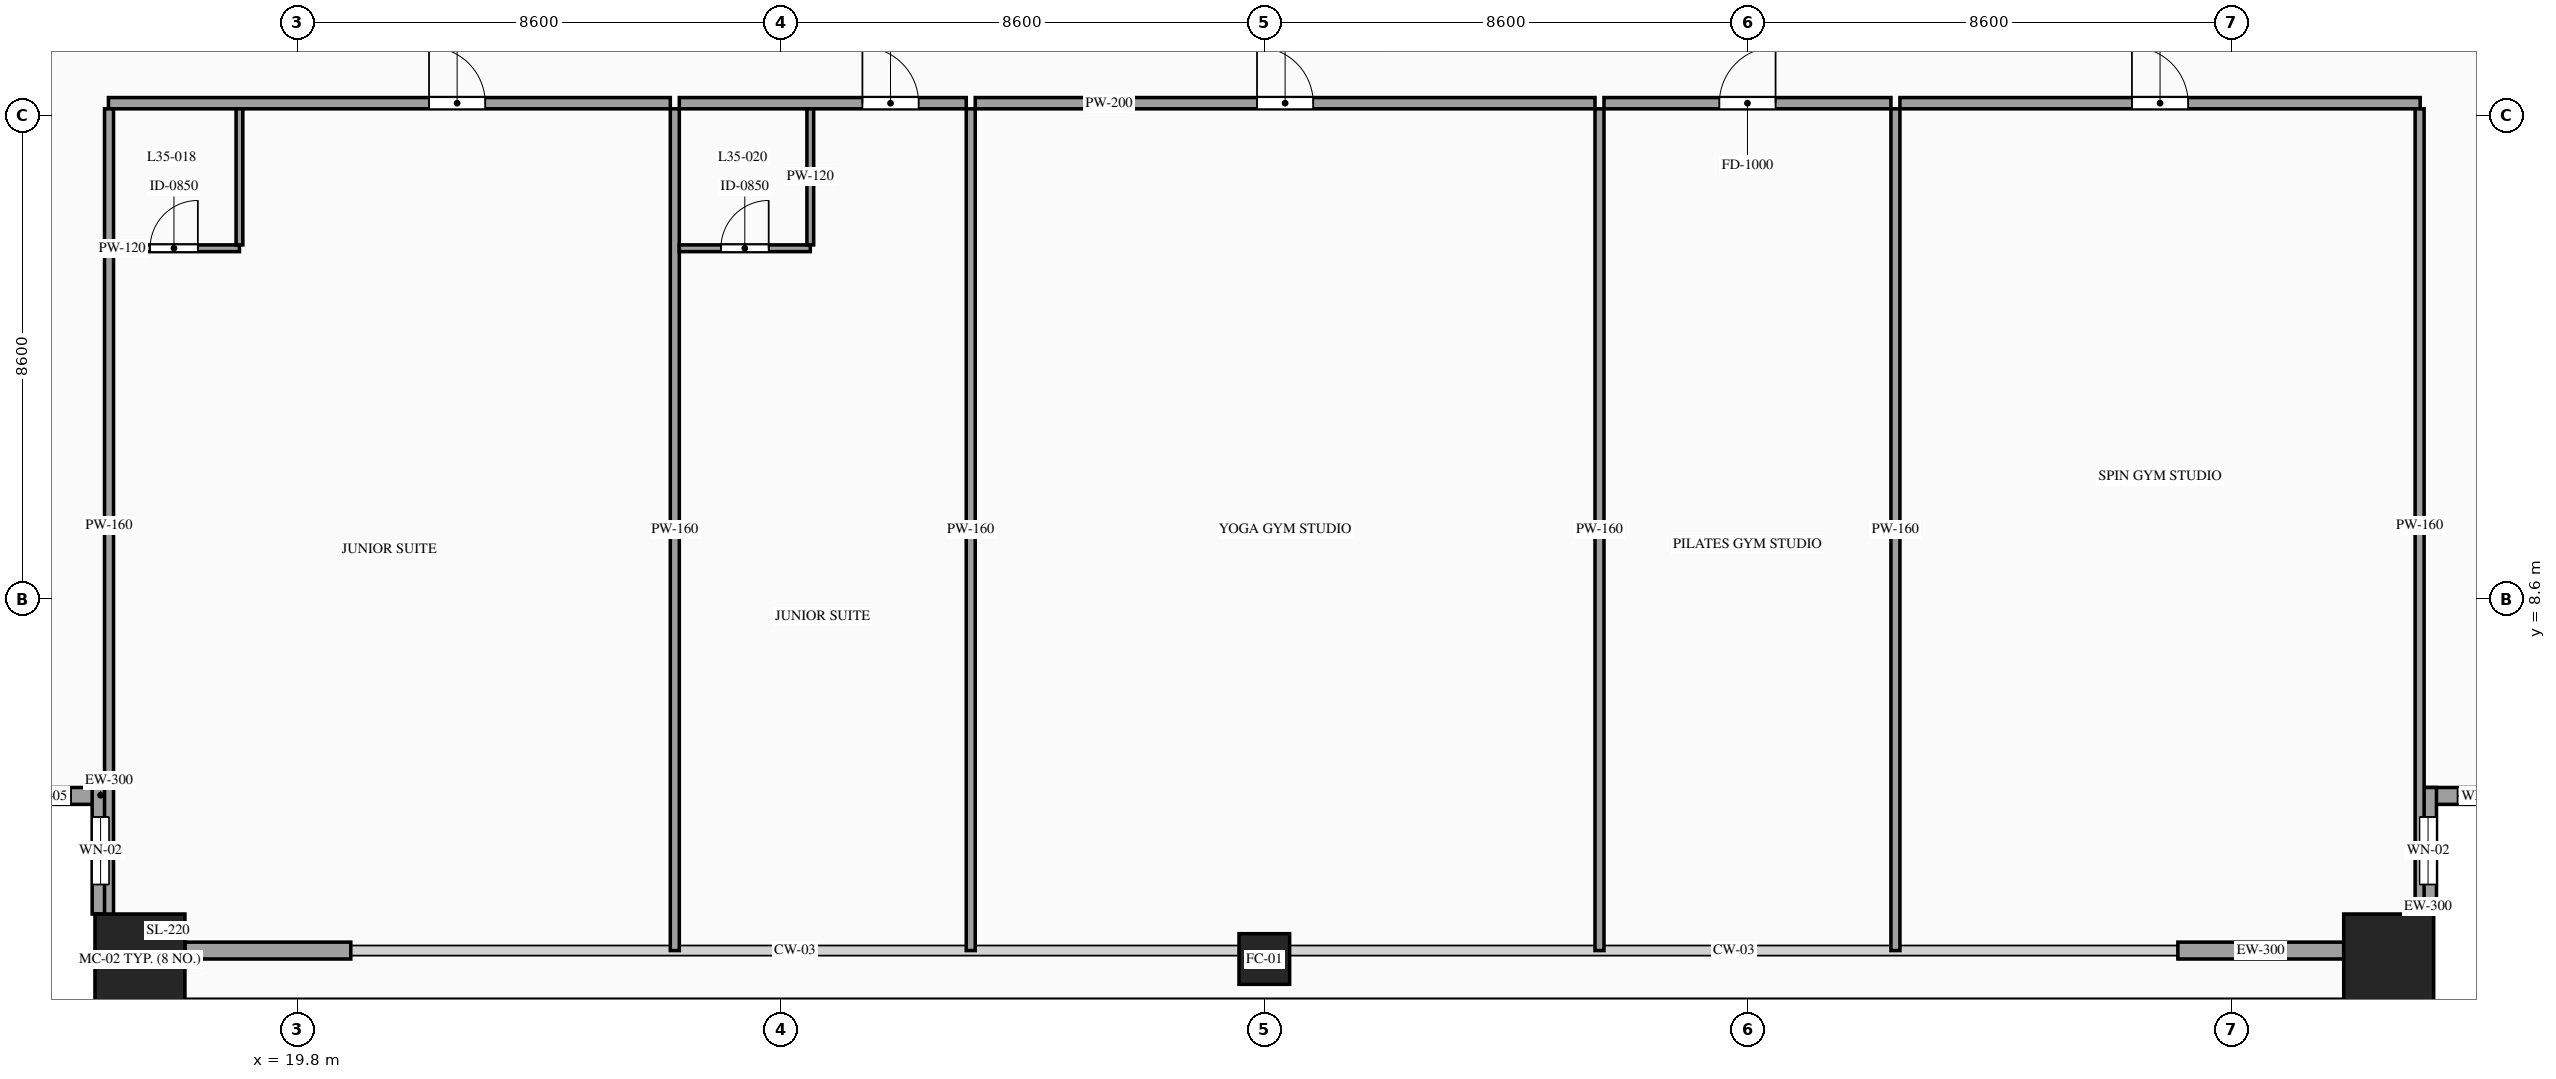
"""IFC4 building model, lengths in metres.
Left out: names, types, materials, properties, quantities, classifications, styles, units other than length and angle.
Written with IfcOpenShell. Run it as: python <this file> out.ifc"""

import sys

from ifc_helpers import new_model, si_unit, direction, frame, frame_2d, origin, origin_2d, place, context, subcontext, project, spatial, rectangle, hollow_rectangle, extrude, source, transform, mapped, element, fill, save


model = new_model("IFC4")
c1 = context("Model", 3, precision=1e-05, world=origin(), true_north=direction((0.0, 1.0)))
c2 = subcontext(c1, "Body", "Model", "MODEL_VIEW")
j1 = project(units=[si_unit("LENGTHUNIT", "METRE"), si_unit("PLANEANGLEUNIT", "RADIAN")], contexts=[c1])
p1 = place(None, origin())
s1 = spatial("IfcSite", under=j1, at=p1, CompositionType="ELEMENT")
p2 = place(p1, origin())
s2 = spatial("IfcBuilding", under=s1, at=p2, CompositionType="ELEMENT")
p3 = place(p2, frame((0.0, 0.0, 134.4)))
s3 = spatial("IfcBuildingStorey", under=s2, at=p3, CompositionType="ELEMENT", Elevation=134.4)
m1 = source(origin(), c2, "Body", "SweptSolid", [
    extrude(hollow_rectangle(XDim=1.6, YDim=1.6, WallThickness=0.07, at=origin_2d()), origin(), (0.0, 0.0, 1.0), 3.6),
])
p4 = place(p3, frame((17.0, 2.2, 0.0), z_axis=(0.0, 0.0, 1.0), x_axis=(1.0, 0.0, 0.0)))
e1 = element("IfcColumn", 1, at=p4, inside=s3, PredefinedType="COLUMN", context=c2, shape_type="MappedRepresentation", body=[
    mapped(m1, transform((0.0, 0.0, 0.0), scale=1.0)),
])
m2 = source(origin(), c2, "Body", "SweptSolid", [
    extrude(hollow_rectangle(XDim=0.9, YDim=0.9, WallThickness=0.042, at=origin_2d()), origin(), (0.0, 0.0, 1.0), 3.6),
])
p5 = place(p3, frame((37.0, 2.2, 0.0), z_axis=(0.0, 0.0, 1.0), x_axis=(1.0, 0.0, 0.0)))
e2 = element("IfcColumn", 2, at=p5, inside=s3, PredefinedType="COLUMN", context=c2, shape_type="MappedRepresentation", body=[
    mapped(m2, transform((0.0, 0.0, 0.0), scale=1.0)),
])
p6 = place(p3, frame((57.0, 2.2, 0.0), z_axis=(0.0, 0.0, 1.0), x_axis=(1.0, 0.0, 0.0)))
e3 = element("IfcColumn", 3, at=p6, inside=s3, PredefinedType="COLUMN", context=c2, shape_type="MappedRepresentation", body=[
    mapped(m1, transform((0.0, 0.0, 0.0), scale=1.0)),
])
p7 = place(p3, frame((14.2, 5.1, 0.0), z_axis=(0.0, 0.0, 1.0), x_axis=(1.0, 0.0, 0.0)))
e4 = element("IfcWall", 4, at=p7, inside=s3, PredefinedType="SOLIDWALL", context=c2, shape_type="SweptSolid", body=[
    extrude(rectangle(XDim=2.25, YDim=0.3, at=frame_2d((1.125, 0.0))), origin(), (0.0, 0.0, 1.0), 3.38),
])
p8 = place(p7, frame((0.675, 0.0, 0.85)))
e5 = element("IfcOpeningElement", 5, at=p8, cuts=e4, PredefinedType="OPENING", context=c2, shape_type="SweptSolid", body=[
    extrude(rectangle(XDim=0.9, YDim=1.5, at=frame_2d((0.45, 0.75))), frame((0.0, 0.165, 0.0), z_axis=(0.0, -1.0, 0.0), x_axis=(1.0, 0.0, 0.0)), (0.0, 0.0, 1.0), 0.33),
])
p9 = place(p3, frame((16.3, 5.25, 0.0), z_axis=(0.0, 0.0, 1.0), x_axis=(0.0, -1.0, 0.0)))
e6 = element("IfcWall", 6, at=p9, inside=s3, PredefinedType="SOLIDWALL", context=c2, shape_type="SweptSolid", body=[
    extrude(rectangle(XDim=2.25, YDim=0.3, at=frame_2d((1.125, 0.0))), origin(), (0.0, 0.0, 1.0), 3.38),
])
p10 = place(p9, frame((0.525, 0.0, 0.85)))
e7 = element("IfcOpeningElement", 7, at=p10, cuts=e6, PredefinedType="OPENING", context=c2, shape_type="SweptSolid", body=[
    extrude(rectangle(XDim=1.2, YDim=2.1, at=frame_2d((0.6, 1.05))), frame((0.0, 0.165, 0.0), z_axis=(0.0, -1.0, 0.0), x_axis=(1.0, 0.0, 0.0)), (0.0, 0.0, 1.0), 0.33),
])
p11 = place(p3, frame((57.55, 5.1, 0.0), z_axis=(0.0, 0.0, 1.0), x_axis=(1.0, 0.0, 0.0)))
e8 = element("IfcWall", 8, at=p11, inside=s3, PredefinedType="SOLIDWALL", context=c2, shape_type="SweptSolid", body=[
    extrude(rectangle(XDim=2.25, YDim=0.3, at=frame_2d((1.125, 0.0))), origin(), (0.0, 0.0, 1.0), 3.38),
])
p12 = place(p11, frame((0.675, 0.0, 0.85)))
e9 = element("IfcOpeningElement", 9, at=p12, cuts=e8, PredefinedType="OPENING", context=c2, shape_type="SweptSolid", body=[
    extrude(rectangle(XDim=0.9, YDim=1.5, at=frame_2d((0.45, 0.75))), frame((0.0, 0.165, 0.0), z_axis=(0.0, -1.0, 0.0), x_axis=(1.0, 0.0, 0.0)), (0.0, 0.0, 1.0), 0.33),
])
p13 = place(p3, frame((57.7, 3.0, 0.0), z_axis=(0.0, 0.0, 1.0), x_axis=(0.0, 1.0, 0.0)))
e10 = element("IfcWall", 10, at=p13, inside=s3, PredefinedType="SOLIDWALL", context=c2, shape_type="SweptSolid", body=[
    extrude(rectangle(XDim=2.25, YDim=0.3, at=frame_2d((1.125, 0.0))), origin(), (0.0, 0.0, 1.0), 3.38),
])
p14 = place(p13, frame((0.525, 0.0, 0.85)))
e11 = element("IfcOpeningElement", 11, at=p14, cuts=e10, PredefinedType="OPENING", context=c2, shape_type="SweptSolid", body=[
    extrude(rectangle(XDim=1.2, YDim=2.1, at=frame_2d((0.6, 1.05))), frame((0.0, 0.165, 0.0), z_axis=(0.0, -1.0, 0.0), x_axis=(1.0, 0.0, 0.0)), (0.0, 0.0, 1.0), 0.33),
])
m3 = source(origin(), c2, "Body", "SweptSolid", [
    extrude(rectangle(XDim=2.95, YDim=0.3, at=frame_2d((1.475, 0.0))), origin(), (0.0, 0.0, 1.0), 2.775),
])
for number, where, z_axis, x_axis in (
    (12, (17.8, 2.35, 0.0), (0.0, 0.0, 1.0), (1.0, 0.0, 0.0)),
    (13, (53.25, 2.35, 0.0), (0.0, 0.0, 1.0), (1.0, 0.0, 0.0)),
):
    element("IfcWall", number, at=place(p3, frame(where, z_axis=z_axis, x_axis=x_axis)), inside=s3, PredefinedType="SOLIDWALL", context=c2, shape_type="MappedRepresentation", body=[
        mapped(m3, transform((0.0, 0.0, 0.0), scale=1.0)),
    ])
p15 = place(p3, frame((16.44, 17.42, 0.0), z_axis=(0.0, 0.0, 1.0), x_axis=(1.0, 0.0, 0.0)))
e14 = element("IfcWall", 14, at=p15, inside=s3, PredefinedType="PARTITIONING", context=c2, shape_type="SweptSolid", body=[
    extrude(rectangle(XDim=9.994, YDim=0.2, at=frame_2d((4.997, 0.0))), origin(), (0.0, 0.0, 1.0), 3.38),
])
p16 = place(p15, frame((5.702, 0.0, 0.0)))
e15 = element("IfcOpeningElement", 15, at=p16, cuts=e14, PredefinedType="OPENING", context=c2, shape_type="SweptSolid", body=[
    extrude(rectangle(XDim=1.0, YDim=2.2, at=frame_2d((0.5, 1.1))), frame((0.0, 0.115, 0.0), z_axis=(0.0, -1.0, 0.0), x_axis=(1.0, 0.0, 0.0)), (0.0, 0.0, 1.0), 0.23),
])
m4 = source(origin(), c2, "Body", "SweptSolid", [
    extrude(rectangle(XDim=14.97, YDim=0.16, at=frame_2d((7.485, 0.0))), origin(), (0.0, 0.0, 1.0), 3.38),
])
p17 = place(p3, frame((26.514, 2.35, 0.0), z_axis=(0.0, 0.0, 1.0), x_axis=(0.0, 1.0, 0.0)))
e16 = element("IfcWall", 16, at=p17, inside=s3, PredefinedType="PARTITIONING", context=c2, shape_type="MappedRepresentation", body=[
    mapped(m4, transform((0.0, 0.0, 0.0), scale=1.0)),
])
p18 = place(p3, frame((16.44, 14.84, 0.0), z_axis=(0.0, 0.0, 1.0), x_axis=(1.0, 0.0, 0.0)))
e17 = element("IfcWall", 17, at=p18, inside=s3, PredefinedType="PARTITIONING", context=c2, shape_type="SweptSolid", body=[
    extrude(rectangle(XDim=2.33, YDim=0.12, at=frame_2d((1.165, 0.0))), origin(), (0.0, 0.0, 1.0), 3.38),
])
p19 = place(p18, frame((0.74, 0.0, 0.0)))
e18 = element("IfcOpeningElement", 18, at=p19, cuts=e17, PredefinedType="OPENING", context=c2, shape_type="SweptSolid", body=[
    extrude(rectangle(XDim=0.85, YDim=2.1, at=frame_2d((0.425, 1.05))), frame((0.0, 0.075, 0.0), z_axis=(0.0, -1.0, 0.0), x_axis=(1.0, 0.0, 0.0)), (0.0, 0.0, 1.0), 0.15),
])
m5 = source(origin(), c2, "Body", "SweptSolid", [
    extrude(rectangle(XDim=2.42, YDim=0.12, at=frame_2d((1.21, 0.0))), origin(), (0.0, 0.0, 1.0), 3.38),
])
p20 = place(p3, frame((18.77, 14.9, 0.0), z_axis=(0.0, 0.0, 1.0), x_axis=(0.0, 1.0, 0.0)))
e19 = element("IfcWall", 19, at=p20, inside=s3, PredefinedType="PARTITIONING", context=c2, shape_type="MappedRepresentation", body=[
    mapped(m5, transform((0.0, 0.0, 0.0), scale=1.0)),
])
p21 = place(p3, frame((26.594, 17.42, 0.0), z_axis=(0.0, 0.0, 1.0), x_axis=(1.0, 0.0, 0.0)))
e20 = element("IfcWall", 20, at=p21, inside=s3, PredefinedType="PARTITIONING", context=c2, shape_type="SweptSolid", body=[
    extrude(rectangle(XDim=5.104, YDim=0.2, at=frame_2d((2.552, 0.0))), origin(), (0.0, 0.0, 1.0), 3.38),
])
p22 = place(p21, frame((3.257, 0.0, 0.0)))
e21 = element("IfcOpeningElement", 21, at=p22, cuts=e20, PredefinedType="OPENING", context=c2, shape_type="SweptSolid", body=[
    extrude(rectangle(XDim=1.0, YDim=2.2, at=frame_2d((0.5, 1.1))), frame((0.0, 0.115, 0.0), z_axis=(0.0, -1.0, 0.0), x_axis=(1.0, 0.0, 0.0)), (0.0, 0.0, 1.0), 0.23),
])
p23 = place(p3, frame((31.778, 2.35, 0.0), z_axis=(0.0, 0.0, 1.0), x_axis=(0.0, 1.0, 0.0)))
e22 = element("IfcWall", 22, at=p23, inside=s3, PredefinedType="PARTITIONING", context=c2, shape_type="MappedRepresentation", body=[
    mapped(m4, transform((0.0, 0.0, 0.0), scale=1.0)),
])
p24 = place(p3, frame((26.594, 14.84, 0.0), z_axis=(0.0, 0.0, 1.0), x_axis=(1.0, 0.0, 0.0)))
e23 = element("IfcWall", 23, at=p24, inside=s3, PredefinedType="PARTITIONING", context=c2, shape_type="SweptSolid", body=[
    extrude(rectangle(XDim=2.33, YDim=0.12, at=frame_2d((1.165, 0.0))), origin(), (0.0, 0.0, 1.0), 3.38),
])
p25 = place(p24, frame((0.74, 0.0, 0.0)))
e24 = element("IfcOpeningElement", 24, at=p25, cuts=e23, PredefinedType="OPENING", context=c2, shape_type="SweptSolid", body=[
    extrude(rectangle(XDim=0.85, YDim=2.1, at=frame_2d((0.425, 1.05))), frame((0.0, 0.075, 0.0), z_axis=(0.0, -1.0, 0.0), x_axis=(1.0, 0.0, 0.0)), (0.0, 0.0, 1.0), 0.15),
])
p26 = place(p3, frame((28.924, 14.9, 0.0), z_axis=(0.0, 0.0, 1.0), x_axis=(0.0, 1.0, 0.0)))
e25 = element("IfcWall", 25, at=p26, inside=s3, PredefinedType="PARTITIONING", context=c2, shape_type="MappedRepresentation", body=[
    mapped(m5, transform((0.0, 0.0, 0.0), scale=1.0)),
])
p27 = place(p3, frame((31.858, 17.42, 0.0), z_axis=(0.0, 0.0, 1.0), x_axis=(1.0, 0.0, 0.0)))
e26 = element("IfcWall", 26, at=p27, inside=s3, PredefinedType="PARTITIONING", context=c2, shape_type="SweptSolid", body=[
    extrude(rectangle(XDim=11.024, YDim=0.2, at=frame_2d((5.512, 0.0))), origin(), (0.0, 0.0, 1.0), 3.38),
])
p28 = place(p27, frame((5.012, 0.0, 0.0)))
e27 = element("IfcOpeningElement", 27, at=p28, cuts=e26, PredefinedType="OPENING", context=c2, shape_type="SweptSolid", body=[
    extrude(rectangle(XDim=1.0, YDim=2.2, at=frame_2d((0.5, 1.1))), frame((0.0, 0.115, 0.0), z_axis=(0.0, -1.0, 0.0), x_axis=(1.0, 0.0, 0.0)), (0.0, 0.0, 1.0), 0.23),
])
p29 = place(p3, frame((42.962, 2.35, 0.0), z_axis=(0.0, 0.0, 1.0), x_axis=(0.0, 1.0, 0.0)))
e28 = element("IfcWall", 28, at=p29, inside=s3, PredefinedType="PARTITIONING", context=c2, shape_type="MappedRepresentation", body=[
    mapped(m4, transform((0.0, 0.0, 0.0), scale=1.0)),
])
p30 = place(p3, frame((43.042, 17.42, 0.0), z_axis=(0.0, 0.0, 1.0), x_axis=(1.0, 0.0, 0.0)))
e29 = element("IfcWall", 29, at=p30, inside=s3, PredefinedType="PARTITIONING", context=c2, shape_type="SweptSolid", body=[
    extrude(rectangle(XDim=5.104, YDim=0.2, at=frame_2d((2.552, 0.0))), origin(), (0.0, 0.0, 1.0), 3.38),
])
p31 = place(p30, frame((2.052, 0.0, 0.0)))
e30 = element("IfcOpeningElement", 30, at=p31, cuts=e29, PredefinedType="OPENING", context=c2, shape_type="SweptSolid", body=[
    extrude(rectangle(XDim=1.0, YDim=2.2, at=frame_2d((0.5, 1.1))), frame((0.0, 0.115, 0.0), z_axis=(0.0, -1.0, 0.0), x_axis=(1.0, 0.0, 0.0)), (0.0, 0.0, 1.0), 0.23),
])
p32 = place(p3, frame((48.226, 2.35, 0.0), z_axis=(0.0, 0.0, 1.0), x_axis=(0.0, 1.0, 0.0)))
e31 = element("IfcWall", 31, at=p32, inside=s3, PredefinedType="PARTITIONING", context=c2, shape_type="MappedRepresentation", body=[
    mapped(m4, transform((0.0, 0.0, 0.0), scale=1.0)),
])
p33 = place(p3, frame((48.306, 17.42, 0.0), z_axis=(0.0, 0.0, 1.0), x_axis=(1.0, 0.0, 0.0)))
e32 = element("IfcWall", 32, at=p33, inside=s3, PredefinedType="PARTITIONING", context=c2, shape_type="SweptSolid", body=[
    extrude(rectangle(XDim=9.254, YDim=0.2, at=frame_2d((4.627, 0.0))), origin(), (0.0, 0.0, 1.0), 3.38),
])
p34 = place(p33, frame((4.127, 0.0, 0.0)))
e33 = element("IfcOpeningElement", 33, at=p34, cuts=e32, PredefinedType="OPENING", context=c2, shape_type="SweptSolid", body=[
    extrude(rectangle(XDim=1.0, YDim=2.2, at=frame_2d((0.5, 1.1))), frame((0.0, 0.115, 0.0), z_axis=(0.0, -1.0, 0.0), x_axis=(1.0, 0.0, 0.0)), (0.0, 0.0, 1.0), 0.23),
])
m6 = source(origin(), c2, "Body", "SweptSolid", [
    extrude(rectangle(XDim=14.82, YDim=0.16, at=frame_2d((7.41, 0.0))), origin(), (0.0, 0.0, 1.0), 3.38),
])
for number, where, z_axis, x_axis in (
    (34, (16.45, 2.5, 0.0), (0.0, 0.0, 1.0), (0.0, 1.0, 0.0)),
    (35, (57.55, 2.5, 0.0), (0.0, 0.0, 1.0), (0.0, 1.0, 0.0)),
):
    element("IfcWall", number, at=place(p3, frame(where, z_axis=z_axis, x_axis=x_axis)), inside=s3, PredefinedType="PARTITIONING", context=c2, shape_type="MappedRepresentation", body=[
        mapped(m6, transform((0.0, 0.0, 0.0), scale=1.0)),
    ])
m7 = source(origin(), c2, "Body", "SweptSolid", [
    extrude(rectangle(XDim=0.9, YDim=1.5, at=frame_2d((0.45, 0.75))), frame((0.0, 0.03, 0.0), z_axis=(0.0, -1.0, 0.0), x_axis=(1.0, 0.0, 0.0)), (0.0, 0.0, 1.0), 0.06),
])
p35 = place(p8, origin())
e36 = element("IfcWindow", 36, at=p35, inside=s3, PartitioningType="SINGLE_PANEL", PredefinedType="WINDOW", context=c2, shape_type="MappedRepresentation", body=[
    mapped(m7, transform((0.0, 0.0, 0.0), scale=1.0)),
])
fill(e5, e36)
m8 = source(origin(), c2, "Body", "SweptSolid", [
    extrude(rectangle(XDim=1.2, YDim=2.1, at=frame_2d((0.6, 1.05))), frame((0.0, 0.03, 0.0), z_axis=(0.0, -1.0, 0.0), x_axis=(1.0, 0.0, 0.0)), (0.0, 0.0, 1.0), 0.06),
])
p36 = place(p10, origin())
e37 = element("IfcWindow", 37, at=p36, inside=s3, PartitioningType="SINGLE_PANEL", PredefinedType="WINDOW", context=c2, shape_type="MappedRepresentation", body=[
    mapped(m8, transform((0.0, 0.0, 0.0), scale=1.0)),
])
fill(e7, e37)
p37 = place(p12, origin())
e38 = element("IfcWindow", 38, at=p37, inside=s3, PartitioningType="SINGLE_PANEL", PredefinedType="WINDOW", context=c2, shape_type="MappedRepresentation", body=[
    mapped(m7, transform((0.0, 0.0, 0.0), scale=1.0)),
])
fill(e9, e38)
p38 = place(p14, origin())
e39 = element("IfcWindow", 39, at=p38, inside=s3, PartitioningType="SINGLE_PANEL", PredefinedType="WINDOW", context=c2, shape_type="MappedRepresentation", body=[
    mapped(m8, transform((0.0, 0.0, 0.0), scale=1.0)),
])
fill(e11, e39)
m9 = source(origin(), c2, "Body", "SweptSolid", [
    extrude(rectangle(XDim=1.0, YDim=2.2, at=frame_2d((0.5, 1.1))), frame((0.0, 0.025, 0.0), z_axis=(0.0, -1.0, 0.0), x_axis=(1.0, 0.0, 0.0)), (0.0, 0.0, 1.0), 0.05),
])
p39 = place(p16, origin())
e40 = element("IfcDoor", 40, at=p39, inside=s3, OperationType="SINGLE_SWING_LEFT", PredefinedType="DOOR", context=c2, shape_type="MappedRepresentation", body=[
    mapped(m9, transform((0.0, 0.0, 0.0), scale=1.0)),
])
fill(e15, e40)
m10 = source(origin(), c2, "Body", "SweptSolid", [
    extrude(rectangle(XDim=0.85, YDim=2.1, at=frame_2d((0.425, 1.05))), frame((0.0, 0.025, 0.0), z_axis=(0.0, -1.0, 0.0), x_axis=(1.0, 0.0, 0.0)), (0.0, 0.0, 1.0), 0.05),
])
p40 = place(p19, origin())
e41 = element("IfcDoor", 41, at=p40, inside=s3, OperationType="SINGLE_SWING_RIGHT", PredefinedType="DOOR", context=c2, shape_type="MappedRepresentation", body=[
    mapped(m10, transform((0.0, 0.0, 0.0), scale=1.0)),
])
fill(e18, e41)
p41 = place(p22, origin())
e42 = element("IfcDoor", 42, at=p41, inside=s3, OperationType="SINGLE_SWING_LEFT", PredefinedType="DOOR", context=c2, shape_type="MappedRepresentation", body=[
    mapped(m9, transform((0.0, 0.0, 0.0), scale=1.0)),
])
fill(e21, e42)
p42 = place(p25, origin())
e43 = element("IfcDoor", 43, at=p42, inside=s3, OperationType="SINGLE_SWING_RIGHT", PredefinedType="DOOR", context=c2, shape_type="MappedRepresentation", body=[
    mapped(m10, transform((0.0, 0.0, 0.0), scale=1.0)),
])
fill(e24, e43)
p43 = place(p28, origin())
e44 = element("IfcDoor", 44, at=p43, inside=s3, OperationType="SINGLE_SWING_LEFT", PredefinedType="DOOR", context=c2, shape_type="MappedRepresentation", body=[
    mapped(m9, transform((0.0, 0.0, 0.0), scale=1.0)),
])
fill(e27, e44)
p44 = place(p31, origin())
e45 = element("IfcDoor", 45, at=p44, inside=s3, OperationType="SINGLE_SWING_RIGHT", PredefinedType="DOOR", context=c2, shape_type="MappedRepresentation", body=[
    mapped(m9, transform((0.0, 0.0, 0.0), scale=1.0)),
])
fill(e30, e45)
p45 = place(p34, origin())
e46 = element("IfcDoor", 46, at=p45, inside=s3, OperationType="SINGLE_SWING_LEFT", PredefinedType="DOOR", context=c2, shape_type="MappedRepresentation", body=[
    mapped(m9, transform((0.0, 0.0, 0.0), scale=1.0)),
])
fill(e33, e46)
save(model, sys.argv[1])
